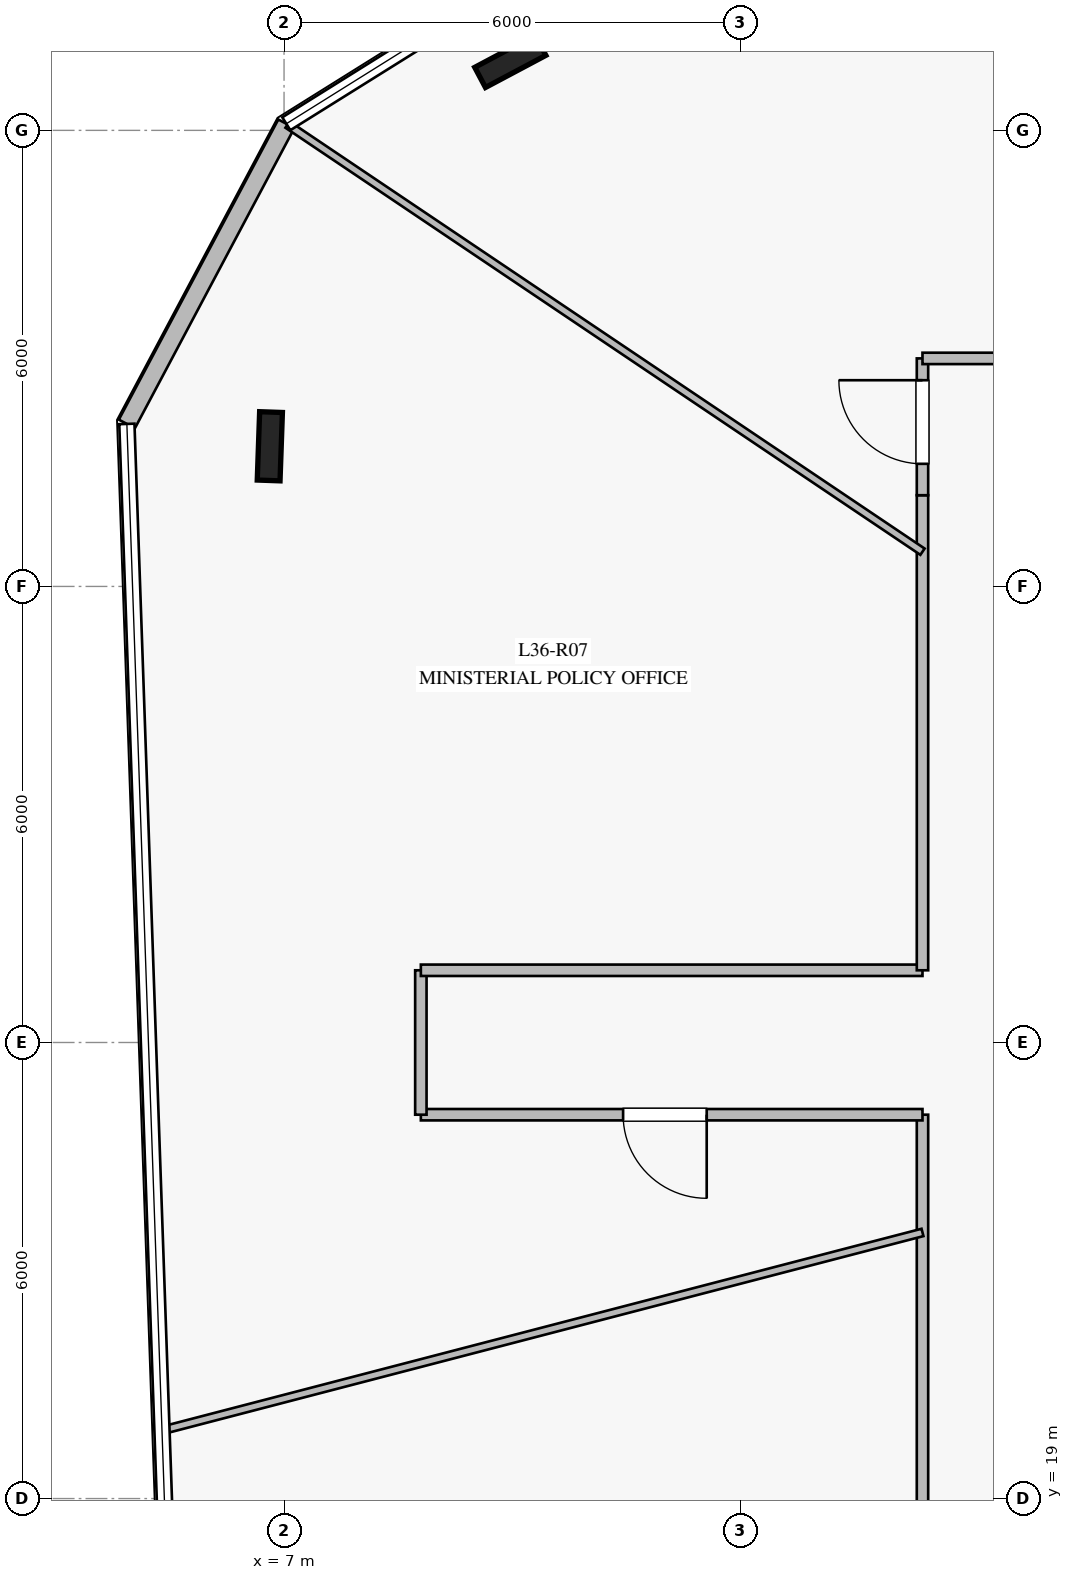
"""IFC4 building model, lengths in metres.
Left out: names, types, materials, properties, quantities, classifications, styles, units other than length and angle.
Written with IfcOpenShell. Run it as: python <this file> out.ifc"""

import sys

from ifc_helpers import new_model, si_unit, direction, frame, frame_2d, origin, origin_2d, place, context, subcontext, project, spatial, rectangle, i_section, extrude, element, fill, save


model = new_model("IFC4")
c1 = context("Model", 3, precision=1e-05, world=origin(), true_north=direction((0.0, 1.0)))
c2 = subcontext(c1, "Body", "Model", "MODEL_VIEW")
j1 = project(units=[si_unit("LENGTHUNIT", "METRE"), si_unit("PLANEANGLEUNIT", "RADIAN")], contexts=[c1])
p1 = place(None, origin())
s1 = spatial("IfcSite", under=j1, at=p1, CompositionType="ELEMENT")
p2 = place(p1, origin())
s2 = spatial("IfcBuilding", under=s1, at=p2, CompositionType="ELEMENT")
p3 = place(p2, frame((0.0, 0.0, 150.4)))
s3 = spatial("IfcBuildingStorey", under=s2, at=p3, CompositionType="ELEMENT", Elevation=150.4)
for number, where, z_axis, x_axis in (
    (1, (9.977, 37.908, 0.0), (0.0, 0.0, 1.0), (0.883, 0.469, 0.0)),
    (2, (6.813, 32.844, 0.0), (0.0, 0.0, 1.0), (0.035, 0.999, 0.0)),
):
    element("IfcColumn", number, at=place(p3, frame(where, z_axis=z_axis, x_axis=x_axis)), inside=s3, PredefinedType="COLUMN", context=c2, shape_type="SweptSolid", body=[
        extrude(i_section(OverallWidth=0.3, OverallDepth=0.9, WebThickness=0.019, FlangeThickness=0.035, at=origin_2d()), origin(), (0.0, 0.0, 1.0), 4.0),
    ])
p4 = place(p3, frame((7.03, 37.087, 0.0), z_axis=(0.0, 0.0, 1.0), x_axis=(-0.46919913514, -0.883092391307, 0.0)))
e3 = element("IfcWall", 3, at=p4, inside=s3, PredefinedType="STANDARD", context=c2, shape_type="SweptSolid", body=[
    extrude(rectangle(XDim=4.472, YDim=0.24, at=frame_2d((2.236, 0.0))), origin(), (0.0, 0.0, 1.0), 3.76),
])
p5 = place(p3, frame((15.4, 17.8, 0.0), z_axis=(0.0, 0.0, 1.0), x_axis=(0.0, 1.0, 0.0)))
e4 = element("IfcWall", 4, at=p5, inside=s3, PredefinedType="PARTITIONING", context=c2, shape_type="SweptSolid", body=[
    extrude(rectangle(XDim=6.25, YDim=0.15, at=frame_2d((3.125, 0.0))), origin(), (0.0, 0.0, 1.0), 3.21),
])
p6 = place(p3, frame((15.4, 24.05, 0.0), z_axis=(0.0, 0.0, 1.0), x_axis=(-1.0, 0.0, 0.0)))
e5 = element("IfcWall", 5, at=p6, inside=s3, PredefinedType="PARTITIONING", context=c2, shape_type="SweptSolid", body=[
    extrude(rectangle(XDim=6.6, YDim=0.15, at=frame_2d((3.3, 0.0))), origin(), (0.0, 0.0, 1.0), 3.05),
])
p7 = place(p6, frame((2.839, 0.0, 0.0)))
e6 = element("IfcOpeningElement", 6, at=p7, cuts=e5, PredefinedType="OPENING", context=c2, shape_type="SweptSolid", body=[
    extrude(rectangle(XDim=1.1, YDim=2.2, at=frame_2d((0.55, 1.1))), frame((0.0, 0.085, 0.0), z_axis=(0.0, -1.0, 0.0), x_axis=(1.0, 0.0, 0.0)), (0.0, 0.0, 1.0), 0.17),
])
p8 = place(p3, frame((8.8, 24.05, 0.0), z_axis=(0.0, 0.0, 1.0), x_axis=(0.0, 1.0, 0.0)))
e7 = element("IfcWall", 7, at=p8, inside=s3, PredefinedType="PARTITIONING", context=c2, shape_type="SweptSolid", body=[
    extrude(rectangle(XDim=1.9, YDim=0.15, at=frame_2d((0.95, 0.0))), origin(), (0.0, 0.0, 1.0), 3.25),
])
p9 = place(p3, frame((8.8, 25.95, 0.0), z_axis=(0.0, 0.0, 1.0), x_axis=(1.0, 0.0, 0.0)))
e8 = element("IfcWall", 8, at=p9, inside=s3, PredefinedType="PARTITIONING", context=c2, shape_type="SweptSolid", body=[
    extrude(rectangle(XDim=6.6, YDim=0.15, at=frame_2d((3.3, 0.0))), origin(), (0.0, 0.0, 1.0), 3.05),
])
p10 = place(p3, frame((15.4, 25.95, 0.0), z_axis=(0.0, 0.0, 1.0), x_axis=(0.0, 1.0, 0.0)))
e9 = element("IfcWall", 9, at=p10, inside=s3, PredefinedType="PARTITIONING", context=c2, shape_type="SweptSolid", body=[
    extrude(rectangle(XDim=6.25, YDim=0.15, at=frame_2d((3.125, 0.0))), origin(), (0.0, 0.0, 1.0), 3.21),
])
p11 = place(p3, frame((15.4, 32.2, 0.0), z_axis=(0.0, 0.0, 1.0), x_axis=(0.0, 1.0, 0.0)))
e10 = element("IfcWall", 10, at=p11, inside=s3, PredefinedType="PARTITIONING", context=c2, shape_type="SweptSolid", body=[
    extrude(rectangle(XDim=1.8, YDim=0.15, at=frame_2d((0.9, 0.0))), origin(), (0.0, 0.0, 1.0), 3.21),
])
p12 = place(p11, frame((0.413, 0.0, 0.0)))
e11 = element("IfcOpeningElement", 11, at=p12, cuts=e10, PredefinedType="OPENING", context=c2, shape_type="SweptSolid", body=[
    extrude(rectangle(XDim=1.1, YDim=2.2, at=frame_2d((0.55, 1.1))), frame((0.0, 0.085, 0.0), z_axis=(0.0, -1.0, 0.0), x_axis=(1.0, 0.0, 0.0)), (0.0, 0.0, 1.0), 0.17),
])
p13 = place(p3, frame((15.4, 34.0, 0.0), z_axis=(0.0, 0.0, 1.0), x_axis=(1.0, 0.0, 0.0)))
e12 = element("IfcWall", 12, at=p13, inside=s3, PredefinedType="PARTITIONING", context=c2, shape_type="SweptSolid", body=[
    extrude(rectangle(XDim=1.8, YDim=0.15, at=frame_2d((0.9, 0.0))), origin(), (0.0, 0.0, 1.0), 3.76),
])
p14 = place(p3, frame((15.4, 31.457, 0.0), z_axis=(0.0, 0.0, 1.0), x_axis=(-0.829771318012, 0.558103538607, 0.0)))
e13 = element("IfcWall", 13, at=p14, inside=s3, PredefinedType="MOVABLE", context=c2, shape_type="SweptSolid", body=[
    extrude(rectangle(XDim=10.068, YDim=0.1, at=frame_2d((5.034, 0.0))), origin(), (0.0, 0.0, 1.0), 3.16),
])
p15 = place(p3, frame((15.4, 22.501, 0.0), z_axis=(0.0, 0.0, 1.0), x_axis=(-0.96772970211, -0.251990522945, 0.0)))
e14 = element("IfcWall", 14, at=p15, inside=s3, PredefinedType="MOVABLE", context=c2, shape_type="SweptSolid", body=[
    extrude(rectangle(XDim=10.322, YDim=0.1, at=frame_2d((5.161, 0.0))), origin(), (0.0, 0.0, 1.0), 3.05),
])
p16 = place(p12, origin())
e15 = element("IfcDoor", 15, at=p16, inside=s3, OperationType="SINGLE_SWING_RIGHT", PredefinedType="DOOR", context=c2, shape_type="SweptSolid", body=[
    extrude(rectangle(XDim=1.1, YDim=2.2, at=frame_2d((0.55, 1.1))), frame((0.0, 0.025, 0.0), z_axis=(0.0, -1.0, 0.0), x_axis=(1.0, 0.0, 0.0)), (0.0, 0.0, 1.0), 0.05),
])
fill(e11, e15)
p17 = place(p7, origin())
e16 = element("IfcDoor", 16, at=p17, inside=s3, OperationType="SINGLE_SWING_LEFT", PredefinedType="DOOR", context=c2, shape_type="SweptSolid", body=[
    extrude(rectangle(XDim=1.1, YDim=2.2, at=frame_2d((0.55, 1.1))), frame((0.0, 0.025, 0.0), z_axis=(0.0, -1.0, 0.0), x_axis=(1.0, 0.0, 0.0)), (0.0, 0.0, 1.0), 0.05),
])
fill(e6, e16)
save(model, sys.argv[1])
